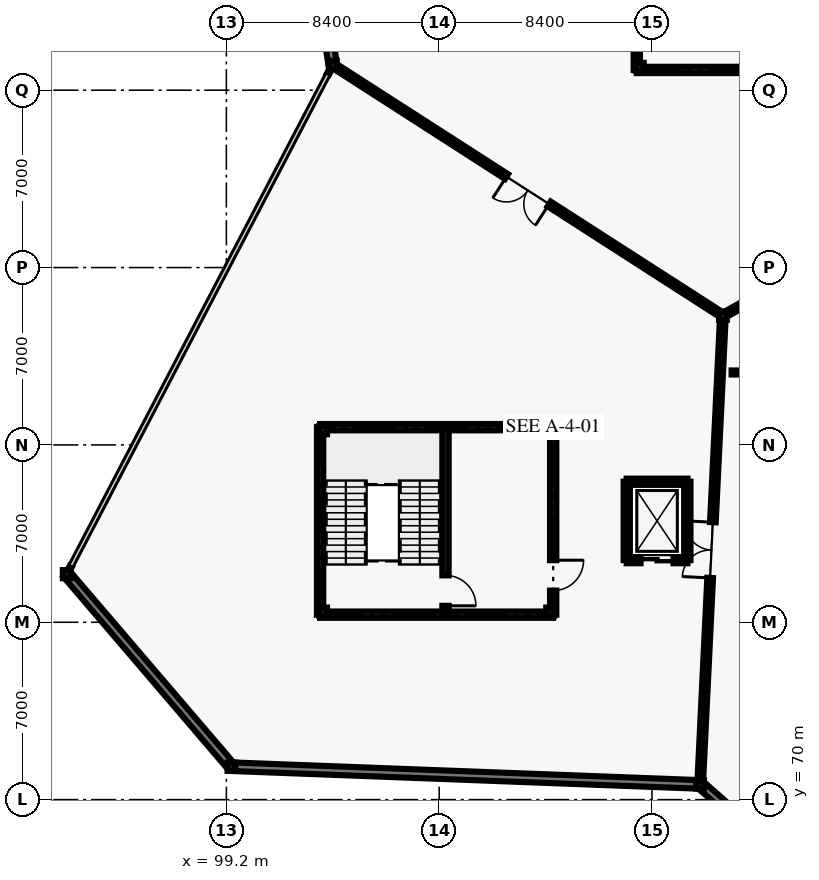
"""IFC4 building model, lengths in metres.
Left out: names, types, materials, properties, quantities, classifications, styles, units other than length and angle.
Written with IfcOpenShell. Run it as: python <this file> out.ifc"""

import sys

from ifc_helpers import new_model, si_unit, direction, frame, frame_2d, origin, origin_2d, place, context, subcontext, project, spatial, rectangle, i_section, extrude, element, fill, save


model = new_model("IFC4")
c1 = context("Model", 3, precision=1e-05, world=origin(), true_north=direction((0.0, 1.0)))
c2 = subcontext(c1, "Body", "Model", "MODEL_VIEW")
j1 = project(units=[si_unit("LENGTHUNIT", "METRE"), si_unit("PLANEANGLEUNIT", "RADIAN")], contexts=[c1])
p1 = place(None, origin())
s1 = spatial("IfcSite", under=j1, at=p1, CompositionType="ELEMENT")
p2 = place(p1, origin())
s2 = spatial("IfcBuilding", under=s1, at=p2, CompositionType="ELEMENT")
p3 = place(p2, frame((0.0, 0.0, 15.0)))
s3 = spatial("IfcBuildingStorey", under=s2, at=p3, CompositionType="ELEMENT", Elevation=15.0)
for number, where, z_axis, x_axis in (
    (1, (92.9, 78.9, 0.0), (0.0, 0.0, 1.0), (1.0, 0.0, 0.0)),
    (2, (99.4, 71.3, 0.0), (0.0, 0.0, 1.0), (1.0, 0.0, 0.0)),
    (3, (103.4, 99.0, 0.0), (0.0, 0.0, 1.0), (1.0, 0.0, 0.0)),
    (4, (117.9, 70.6, 0.0), (0.0, 0.0, 1.0), (1.0, 0.0, 0.0)),
    (5, (118.8, 89.1, 0.0), (0.0, 0.0, 1.0), (1.0, 0.0, 0.0)),
    (6, (103.02, 77.42, 0.0), (0.0, 0.0, 1.0), (1.0, 0.0, 0.0)),
    (7, (111.98, 77.42, 0.0), (0.0, 0.0, 1.0), (1.0, 0.0, 0.0)),
    (8, (111.98, 84.58, 0.0), (0.0, 0.0, 1.0), (1.0, 0.0, 0.0)),
    (9, (103.02, 84.58, 0.0), (0.0, 0.0, 1.0), (1.0, 0.0, 0.0)),
    (10, (115.52, 98.92, 0.0), (0.0, 0.0, 1.0), (1.0, 0.0, 0.0)),
):
    element("IfcColumn", number, at=place(p3, frame(where, z_axis=z_axis, x_axis=x_axis)), inside=s3, PredefinedType="COLUMN", context=c2, shape_type="SweptSolid", body=[
        extrude(i_section(OverallWidth=0.309, OverallDepth=0.321, WebThickness=0.014, FlangeThickness=0.022, FilletRadius=0.017, at=origin_2d()), origin(), (0.0, 0.0, 1.0), 4.8),
    ])
p4 = place(p3, frame((117.84, 70.602, 0.0), z_axis=(0.0, 0.0, 1.0), x_axis=(-0.999284381651, 0.037824920194, 0.0)))
e11 = element("IfcWall", 11, at=p4, inside=s3, PredefinedType="SOLIDWALL", context=c2, shape_type="SweptSolid", body=[
    extrude(rectangle(XDim=18.453, YDim=0.34, at=frame_2d((9.227, 0.0))), origin(), (0.0, 0.0, 1.0), 3.62),
])
for number, where, z_axis, x_axis in (
    (12, (92.919, 78.937, 0.0), (0.0, 0.0, 1.0), (0.464, 0.886, 0.0)),
    (13, (103.21, 98.637, 0.0), (0.0, 0.0, 1.0), (0.464, 0.886, 0.0)),
):
    element("IfcWall", number, at=place(p3, frame(where, z_axis=z_axis, x_axis=x_axis)), inside=s3, PredefinedType="SOLIDWALL", context=c2, shape_type="SweptSolid", body=[
        extrude(rectangle(XDim=0.308, YDim=0.095, at=frame_2d((0.154, 0.0))), origin(), (0.0, 0.0, 1.0), 3.62),
    ])
p5 = place(p3, frame((99.4, 71.3, 0.0), z_axis=(0.0, 0.0, 1.0), x_axis=(-0.649974737731, 0.75995581471, 0.0)))
e14 = element("IfcWall", 14, at=p5, inside=s3, PredefinedType="SOLIDWALL", context=c2, shape_type="SweptSolid", body=[
    extrude(rectangle(XDim=10.0, YDim=0.34, at=frame_2d((5.0, 0.0))), origin(), (0.0, 0.0, 1.0), 3.62),
])
p6 = place(p3, frame((125.5, 63.9, 0.0), z_axis=(0.0, 0.0, 1.0), x_axis=(-0.750131359252, 0.661288850554, 0.0)))
e15 = element("IfcWall", 15, at=p6, inside=s3, PredefinedType="SOLIDWALL", context=c2, shape_type="SweptSolid", body=[
    extrude(rectangle(XDim=10.072, YDim=0.34, at=frame_2d((5.036, 0.0))), origin(), (0.0, 0.0, 1.0), 3.62),
])
p7 = place(p3, frame((103.391, 99.059, 0.0), z_axis=(0.0, 0.0, 1.0), x_axis=(-0.153783616147, 0.988104548823, 0.0)))
e16 = element("IfcWall", 16, at=p7, inside=s3, PredefinedType="SOLIDWALL", context=c2, shape_type="SweptSolid", body=[
    extrude(rectangle(XDim=4.494, YDim=0.34, at=frame_2d((2.247, 0.0))), origin(), (0.0, 0.0, 1.0), 3.62),
])
p8 = place(p3, frame((117.9, 70.6, 0.0), z_axis=(0.0, 0.0, 1.0), x_axis=(0.048599072515, 0.998818366947, 0.0)))
e17 = element("IfcWall", 17, at=p8, inside=s3, PredefinedType="SOLIDWALL", context=c2, shape_type="SweptSolid", body=[
    extrude(rectangle(XDim=18.522, YDim=0.225, at=frame_2d((9.261, 0.0))), origin(), (0.0, 0.0, 1.0), 4.02),
])
p9 = place(p8, frame((8.161, 0.0, 0.0)))
e18 = element("IfcOpeningElement", 18, at=p9, cuts=e17, PredefinedType="OPENING", context=c2, shape_type="SweptSolid", body=[
    extrude(rectangle(XDim=2.2, YDim=2.6, at=frame_2d((1.1, 1.3))), frame((0.0, 0.123, 0.0), z_axis=(0.0, -1.0, 0.0), x_axis=(1.0, 0.0, 0.0)), (0.0, 0.0, 1.0), 0.245),
])
p10 = place(p3, frame((118.8, 89.1, 0.0), z_axis=(0.0, 0.0, 1.0), x_axis=(-0.841183241423, 0.540750177392, 0.0)))
e19 = element("IfcWall", 19, at=p10, inside=s3, PredefinedType="SOLIDWALL", context=c2, shape_type="SweptSolid", body=[
    extrude(rectangle(XDim=18.308, YDim=0.225, at=frame_2d((9.154, 0.0))), origin(), (0.0, 0.0, 1.0), 4.02),
])
p11 = place(p10, frame((8.154, 0.0, 0.0)))
e20 = element("IfcOpeningElement", 20, at=p11, cuts=e19, PredefinedType="OPENING", context=c2, shape_type="SweptSolid", body=[
    extrude(rectangle(XDim=2.0, YDim=2.5, at=frame_2d((1.0, 1.25))), frame((0.0, 0.123, 0.0), z_axis=(0.0, -1.0, 0.0), x_axis=(1.0, 0.0, 0.0)), (0.0, 0.0, 1.0), 0.245),
])
p12 = place(p3, frame((134.9, 98.0, 0.0), z_axis=(0.0, 0.0, 1.0), x_axis=(-0.875181353329, -0.483794996652, 0.0)))
e21 = element("IfcWall", 21, at=p12, inside=s3, PredefinedType="SOLIDWALL", context=c2, shape_type="SweptSolid", body=[
    extrude(rectangle(XDim=18.396, YDim=0.225, at=frame_2d((9.198, 0.0))), origin(), (0.0, 0.0, 1.0), 4.02),
])
p13 = place(p12, frame((8.273, 0.0, 0.0)))
e22 = element("IfcOpeningElement", 22, at=p13, cuts=e21, PredefinedType="OPENING", context=c2, shape_type="SweptSolid", body=[
    extrude(rectangle(XDim=1.85, YDim=2.4, at=frame_2d((0.925, 1.2))), frame((0.0, 0.123, 0.0), z_axis=(0.0, -1.0, 0.0), x_axis=(1.0, 0.0, 0.0)), (0.0, 0.0, 1.0), 0.245),
])
p14 = place(p3, frame((119.142, 86.859, 0.0), z_axis=(0.0, 0.0, 1.0), x_axis=(1.0, 0.0, 0.0)))
e23 = element("IfcWall", 23, at=p14, inside=s3, PredefinedType="PARTITIONING", context=c2, shape_type="SweptSolid", body=[
    extrude(rectangle(XDim=6.858, YDim=0.16, at=frame_2d((3.429, 0.0))), origin(), (0.0, 0.0, 1.0), 3.32),
])
p15 = place(p14, frame((2.939, 0.0, 0.0)))
e24 = element("IfcOpeningElement", 24, at=p15, cuts=e23, PredefinedType="OPENING", context=c2, shape_type="SweptSolid", body=[
    extrude(rectangle(XDim=0.98, YDim=2.15, at=frame_2d((0.49, 1.075))), frame((0.0, 0.09, 0.0), z_axis=(0.0, -1.0, 0.0), x_axis=(1.0, 0.0, 0.0)), (0.0, 0.0, 1.0), 0.18),
])
p16 = place(p3, frame((102.9, 77.3, 0.0), z_axis=(0.0, 0.0, 1.0), x_axis=(0.0, 1.0, 0.0)))
e25 = element("IfcWall", 25, at=p16, inside=s3, PredefinedType="SHEAR", context=c2, shape_type="SweptSolid", body=[
    extrude(rectangle(XDim=7.4, YDim=0.25, at=frame_2d((3.7, 0.0))), origin(), (0.0, 0.0, 1.0), 4.56),
])
for number, where, z_axis, x_axis in (
    (26, (102.9, 84.7, 0.0), (0.0, 0.0, 1.0), (1.0, 0.0, 0.0)),
    (27, (112.1, 77.3, 0.0), (0.0, 0.0, 1.0), (-1.0, 0.0, 0.0)),
):
    element("IfcWall", number, at=place(p3, frame(where, z_axis=z_axis, x_axis=x_axis)), inside=s3, PredefinedType="SHEAR", context=c2, shape_type="SweptSolid", body=[
        extrude(rectangle(XDim=9.2, YDim=0.25, at=frame_2d((4.6, 0.0))), origin(), (0.0, 0.0, 1.0), 4.56),
    ])
p17 = place(p3, frame((112.1, 84.7, 0.0), z_axis=(0.0, 0.0, 1.0), x_axis=(0.0, -1.0, 0.0)))
e28 = element("IfcWall", 28, at=p17, inside=s3, PredefinedType="SHEAR", context=c2, shape_type="SweptSolid", body=[
    extrude(rectangle(XDim=7.4, YDim=0.25, at=frame_2d((3.7, 0.0))), origin(), (0.0, 0.0, 1.0), 4.56),
])
p18 = place(p17, frame((5.25, 0.0, 0.0)))
e29 = element("IfcOpeningElement", 29, at=p18, cuts=e28, PredefinedType="OPENING", context=c2, shape_type="SweptSolid", body=[
    extrude(rectangle(XDim=1.2, YDim=2.2, at=frame_2d((0.6, 1.1))), frame((0.0, 0.135, 0.0), z_axis=(0.0, -1.0, 0.0), x_axis=(1.0, 0.0, 0.0)), (0.0, 0.0, 1.0), 0.27),
])
p19 = place(p3, frame((107.85, 84.7, 0.0), z_axis=(0.0, 0.0, 1.0), x_axis=(0.0, -1.0, 0.0)))
e30 = element("IfcWall", 30, at=p19, inside=s3, PredefinedType="SHEAR", context=c2, shape_type="SweptSolid", body=[
    extrude(rectangle(XDim=7.4, YDim=0.25, at=frame_2d((3.7, 0.0))), origin(), (0.0, 0.0, 1.0), 4.56),
])
p20 = place(p19, frame((5.85, 0.0, 0.0)))
e31 = element("IfcOpeningElement", 31, at=p20, cuts=e30, PredefinedType="OPENING", context=c2, shape_type="SweptSolid", body=[
    extrude(rectangle(XDim=1.2, YDim=2.2, at=frame_2d((0.6, 1.1))), frame((0.0, 0.135, 0.0), z_axis=(0.0, -1.0, 0.0), x_axis=(1.0, 0.0, 0.0)), (0.0, 0.0, 1.0), 0.27),
])
p21 = place(p3, frame((115.4, 98.8, 0.0), z_axis=(0.0, 0.0, 1.0), x_axis=(0.0, 1.0, 0.0)))
e32 = element("IfcWall", 32, at=p21, inside=s3, PredefinedType="SHEAR", context=c2, shape_type="SweptSolid", body=[
    extrude(rectangle(XDim=7.4, YDim=0.25, at=frame_2d((3.7, 0.0))), origin(), (0.0, 0.0, 1.0), 4.56),
])
p22 = place(p3, frame((124.6, 98.8, 0.0), z_axis=(0.0, 0.0, 1.0), x_axis=(-1.0, 0.0, 0.0)))
e33 = element("IfcWall", 33, at=p22, inside=s3, PredefinedType="SHEAR", context=c2, shape_type="SweptSolid", body=[
    extrude(rectangle(XDim=9.2, YDim=0.25, at=frame_2d((4.6, 0.0))), origin(), (0.0, 0.0, 1.0), 4.56),
])
p23 = place(p3, frame((115.0, 82.55, 0.0), z_axis=(0.0, 0.0, 1.0), x_axis=(1.0, 0.0, 0.0)))
e34 = element("IfcWall", 34, at=p23, inside=s3, PredefinedType="SHEAR", context=c2, shape_type="SweptSolid", body=[
    extrude(rectangle(XDim=2.4, YDim=0.24, at=frame_2d((1.2, 0.0))), origin(), (0.0, 0.0, 1.0), 4.56),
])
for number, where, z_axis, x_axis in (
    (35, (117.4, 82.55, 0.0), (0.0, 0.0, 1.0), (0.0, -1.0, 0.0)),
    (36, (115.0, 79.45, 0.0), (0.0, 0.0, 1.0), (0.0, 1.0, 0.0)),
):
    element("IfcWall", number, at=place(p3, frame(where, z_axis=z_axis, x_axis=x_axis)), inside=s3, PredefinedType="SHEAR", context=c2, shape_type="SweptSolid", body=[
        extrude(rectangle(XDim=3.1, YDim=0.24, at=frame_2d((1.55, 0.0))), origin(), (0.0, 0.0, 1.0), 4.56),
    ])
p24 = place(p3, frame((117.4, 79.45, 0.0), z_axis=(0.0, 0.0, 1.0), x_axis=(-1.0, 0.0, 0.0)))
e37 = element("IfcWall", 37, at=p24, inside=s3, PredefinedType="SHEAR", context=c2, shape_type="SweptSolid", body=[
    extrude(rectangle(XDim=2.4, YDim=0.24, at=frame_2d((1.2, 0.0))), origin(), (0.0, 0.0, 1.0), 4.56),
])
p25 = place(p24, frame((0.55, 0.0, 0.0)))
e38 = element("IfcOpeningElement", 38, at=p25, cuts=e37, PredefinedType="OPENING", context=c2, shape_type="SweptSolid", body=[
    extrude(rectangle(XDim=1.3, YDim=2.25, at=frame_2d((0.65, 1.125))), frame((0.0, 0.13, 0.0), z_axis=(0.0, -1.0, 0.0), x_axis=(1.0, 0.0, 0.0)), (0.0, 0.0, 1.0), 0.26),
])
p26 = place(p9, origin())
e39 = element("IfcDoor", 39, at=p26, inside=s3, OperationType="DOUBLE_DOOR_SINGLE_SWING", PredefinedType="DOOR", context=c2, shape_type="SweptSolid", body=[
    extrude(rectangle(XDim=2.2, YDim=2.6, at=frame_2d((1.1, 1.3))), frame((0.0, 0.025, 0.0), z_axis=(0.0, -1.0, 0.0), x_axis=(1.0, 0.0, 0.0)), (0.0, 0.0, 1.0), 0.05),
])
fill(e18, e39)
p27 = place(p11, origin())
e40 = element("IfcDoor", 40, at=p27, inside=s3, OperationType="DOUBLE_DOOR_SINGLE_SWING", PredefinedType="DOOR", context=c2, shape_type="SweptSolid", body=[
    extrude(rectangle(XDim=2.0, YDim=2.5, at=frame_2d((1.0, 1.25))), frame((0.0, 0.025, 0.0), z_axis=(0.0, -1.0, 0.0), x_axis=(1.0, 0.0, 0.0)), (0.0, 0.0, 1.0), 0.05),
])
fill(e20, e40)
p28 = place(p18, origin())
e41 = element("IfcDoor", 41, at=p28, inside=s3, OperationType="SINGLE_SWING_LEFT", PredefinedType="DOOR", context=c2, shape_type="SweptSolid", body=[
    extrude(rectangle(XDim=1.2, YDim=2.2, at=frame_2d((0.6, 1.1))), frame((0.0, 0.025, 0.0), z_axis=(0.0, -1.0, 0.0), x_axis=(1.0, 0.0, 0.0)), (0.0, 0.0, 1.0), 0.05),
])
fill(e29, e41)
p29 = place(p20, origin())
e42 = element("IfcDoor", 42, at=p29, inside=s3, OperationType="SINGLE_SWING_RIGHT", PredefinedType="DOOR", context=c2, shape_type="SweptSolid", body=[
    extrude(rectangle(XDim=1.2, YDim=2.2, at=frame_2d((0.6, 1.1))), frame((0.0, 0.025, 0.0), z_axis=(0.0, -1.0, 0.0), x_axis=(1.0, 0.0, 0.0)), (0.0, 0.0, 1.0), 0.05),
])
fill(e31, e42)
p30 = place(p25, origin())
e43 = element("IfcDoor", 43, at=p30, inside=s3, OperationType="SLIDING_TO_LEFT", PredefinedType="DOOR", context=c2, shape_type="SweptSolid", body=[
    extrude(rectangle(XDim=1.3, YDim=2.25, at=frame_2d((0.65, 1.125))), frame((0.0, 0.025, 0.0), z_axis=(0.0, -1.0, 0.0), x_axis=(1.0, 0.0, 0.0)), (0.0, 0.0, 1.0), 0.05),
])
fill(e38, e43)
save(model, sys.argv[1])
